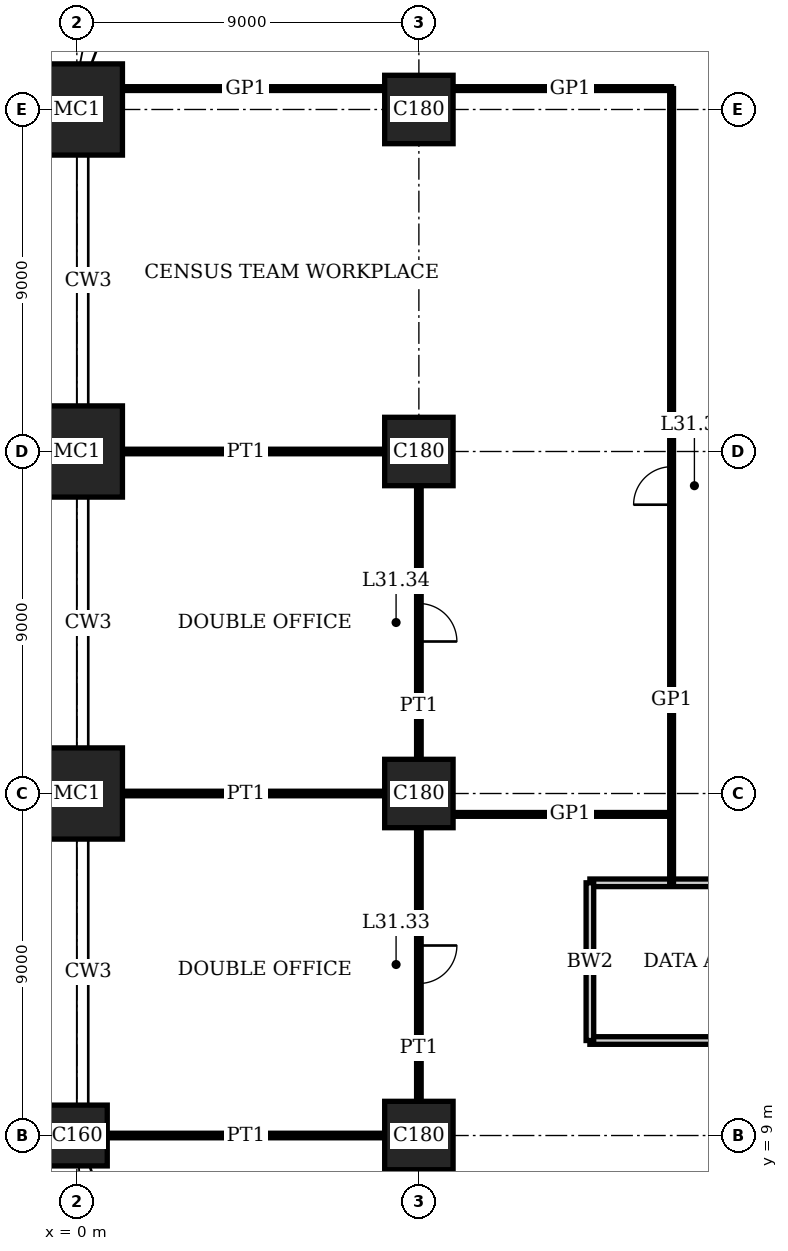
"""IFC4 building model, lengths in metres.
Left out: names, types, materials, properties, quantities, classifications, styles, units other than length and angle.
Written with IfcOpenShell. Run it as: python <this file> out.ifc"""

import sys

from ifc_helpers import new_model, si_unit, direction, frame, frame_2d, origin, origin_2d, place, context, subcontext, project, spatial, rectangle, extrude, element, fill, save


model = new_model("IFC4")
c1 = context("Model", 3, precision=1e-05, world=origin(), true_north=direction((0.0, 1.0)))
c2 = subcontext(c1, "Body", "Model", "MODEL_VIEW")
j1 = project(units=[si_unit("LENGTHUNIT", "METRE"), si_unit("PLANEANGLEUNIT", "RADIAN")], contexts=[c1])
p1 = place(None, origin())
s1 = spatial("IfcSite", under=j1, at=p1, CompositionType="ELEMENT")
p2 = place(p1, origin())
s2 = spatial("IfcBuilding", under=s1, at=p2, CompositionType="ELEMENT")
p3 = place(p2, frame((0.0, 0.0, 129.0)))
s3 = spatial("IfcBuildingStorey", under=s2, at=p3, CompositionType="ELEMENT", Elevation=129.0)
p4 = place(p3, frame((0.0, 9.0, 0.0), z_axis=(0.0, 0.0, 1.0), x_axis=(1.0, 0.0, 0.0)))
e1 = element("IfcColumn", 1, at=p4, inside=s3, PredefinedType="COLUMN", context=c2, shape_type="SweptSolid", body=[
    extrude(rectangle(XDim=1.6, YDim=1.6, at=origin_2d()), origin(), (0.0, 0.0, 1.0), 4.0),
])
for number, where, z_axis, x_axis in (
    (2, (0.0, 18.0, 0.0), (0.0, 0.0, 1.0), (1.0, 0.0, 0.0)),
    (3, (0.0, 27.0, 0.0), (0.0, 0.0, 1.0), (1.0, 0.0, 0.0)),
    (4, (0.0, 36.0, 0.0), (0.0, 0.0, 1.0), (1.0, 0.0, 0.0)),
):
    element("IfcColumn", number, at=place(p3, frame(where, z_axis=z_axis, x_axis=x_axis)), inside=s3, PredefinedType="COLUMN", context=c2, shape_type="SweptSolid", body=[
        extrude(rectangle(XDim=2.4, YDim=2.4, at=origin_2d()), origin(), (0.0, 0.0, 1.0), 4.0),
    ])
for number, where, z_axis, x_axis in (
    (5, (9.0, 9.0, 0.0), (0.0, 0.0, 1.0), (1.0, 0.0, 0.0)),
    (6, (9.0, 18.0, 0.0), (0.0, 0.0, 1.0), (1.0, 0.0, 0.0)),
    (7, (9.0, 27.0, 0.0), (0.0, 0.0, 1.0), (1.0, 0.0, 0.0)),
    (8, (9.0, 36.0, 0.0), (0.0, 0.0, 1.0), (1.0, 0.0, 0.0)),
):
    element("IfcColumn", number, at=place(p3, frame(where, z_axis=z_axis, x_axis=x_axis)), inside=s3, PredefinedType="COLUMN", context=c2, shape_type="SweptSolid", body=[
        extrude(rectangle(XDim=1.8, YDim=1.8, at=origin_2d()), origin(), (0.0, 0.0, 1.0), 4.0),
    ])
p5 = place(p3, frame((0.8, 9.0, 0.0), z_axis=(0.0, 0.0, 1.0), x_axis=(1.0, 0.0, 0.0)))
e9 = element("IfcWall", 9, at=p5, inside=s3, PredefinedType="PARTITIONING", context=c2, shape_type="SweptSolid", body=[
    extrude(rectangle(XDim=7.3, YDim=0.12, at=frame_2d((3.65, 0.0))), origin(), (0.0, 0.0, 1.0), 3.05),
])
p6 = place(p3, frame((13.5, 11.5, 0.0), z_axis=(0.0, 0.0, 1.0), x_axis=(1.0, 0.0, 0.0)))
e10 = element("IfcWall", 10, at=p6, inside=s3, PredefinedType="SOLIDWALL", context=c2, shape_type="SweptSolid", body=[
    extrude(rectangle(XDim=9.0, YDim=0.2, at=frame_2d((4.5, 0.0))), origin(), (0.0, 0.0, 1.0), 3.75),
])
p7 = place(p6, frame((4.0, 0.0, 0.0)))
e11 = element("IfcOpeningElement", 11, at=p7, cuts=e10, PredefinedType="OPENING", context=c2, shape_type="SweptSolid", body=[
    extrude(rectangle(XDim=1.0, YDim=2.4, at=frame_2d((0.5, 1.2))), frame((0.0, 0.11, 0.0), z_axis=(0.0, -1.0, 0.0), x_axis=(1.0, 0.0, 0.0)), (0.0, 0.0, 1.0), 0.22),
])
p8 = place(p3, frame((13.5, 15.65, 0.0), z_axis=(0.0, 0.0, 1.0), x_axis=(1.0, 0.0, 0.0)))
e12 = element("IfcWall", 12, at=p8, inside=s3, PredefinedType="SOLIDWALL", context=c2, shape_type="SweptSolid", body=[
    extrude(rectangle(XDim=9.0, YDim=0.2, at=frame_2d((4.5, 0.0))), origin(), (0.0, 0.0, 1.0), 3.75),
])
p9 = place(p3, frame((9.9, 17.45, 0.0), z_axis=(0.0, 0.0, 1.0), x_axis=(1.0, 0.0, 0.0)))
e13 = element("IfcWall", 13, at=p9, inside=s3, PredefinedType="PARTITIONING", context=c2, shape_type="SweptSolid", body=[
    extrude(rectangle(XDim=5.75, YDim=0.1, at=frame_2d((2.875, 0.0))), origin(), (0.0, 0.0, 1.0), 3.75),
])
for number, where, z_axis, x_axis in (
    (14, (1.2, 18.0, 0.0), (0.0, 0.0, 1.0), (1.0, 0.0, 0.0)),
    (15, (1.2, 27.0, 0.0), (0.0, 0.0, 1.0), (1.0, 0.0, 0.0)),
):
    element("IfcWall", number, at=place(p3, frame(where, z_axis=z_axis, x_axis=x_axis)), inside=s3, PredefinedType="PARTITIONING", context=c2, shape_type="SweptSolid", body=[
        extrude(rectangle(XDim=6.9, YDim=0.12, at=frame_2d((3.45, 0.0))), origin(), (0.0, 0.0, 1.0), 3.05),
    ])
p10 = place(p3, frame((1.2, 36.55, 0.0), z_axis=(0.0, 0.0, 1.0), x_axis=(1.0, 0.0, 0.0)))
e16 = element("IfcWall", 16, at=p10, inside=s3, PredefinedType="PARTITIONING", context=c2, shape_type="SweptSolid", body=[
    extrude(rectangle(XDim=6.9, YDim=0.1, at=frame_2d((3.45, 0.0))), origin(), (0.0, 0.0, 1.0), 3.75),
])
p11 = place(p3, frame((9.9, 36.55, 0.0), z_axis=(0.0, 0.0, 1.0), x_axis=(1.0, 0.0, 0.0)))
e17 = element("IfcWall", 17, at=p11, inside=s3, PredefinedType="PARTITIONING", context=c2, shape_type="SweptSolid", body=[
    extrude(rectangle(XDim=5.75, YDim=0.1, at=frame_2d((2.875, 0.0))), origin(), (0.0, 0.0, 1.0), 3.75),
])
p12 = place(p3, frame((9.0, 9.9, 0.0), z_axis=(0.0, 0.0, 1.0), x_axis=(0.0, 1.0, 0.0)))
e18 = element("IfcWall", 18, at=p12, inside=s3, PredefinedType="PARTITIONING", context=c2, shape_type="SweptSolid", body=[
    extrude(rectangle(XDim=7.2, YDim=0.12, at=frame_2d((3.6, 0.0))), origin(), (0.0, 0.0, 1.0), 3.05),
])
p13 = place(p12, frame((3.1, 0.0, 0.0)))
e19 = element("IfcOpeningElement", 19, at=p13, cuts=e18, PredefinedType="OPENING", context=c2, shape_type="SweptSolid", body=[
    extrude(rectangle(XDim=1.0, YDim=2.4, at=frame_2d((0.5, 1.2))), frame((0.0, 0.07, 0.0), z_axis=(0.0, -1.0, 0.0), x_axis=(1.0, 0.0, 0.0)), (0.0, 0.0, 1.0), 0.14),
])
p14 = place(p3, frame((9.0, 18.9, 0.0), z_axis=(0.0, 0.0, 1.0), x_axis=(0.0, 1.0, 0.0)))
e20 = element("IfcWall", 20, at=p14, inside=s3, PredefinedType="PARTITIONING", context=c2, shape_type="SweptSolid", body=[
    extrude(rectangle(XDim=7.2, YDim=0.12, at=frame_2d((3.6, 0.0))), origin(), (0.0, 0.0, 1.0), 3.05),
])
p15 = place(p14, frame((3.1, 0.0, 0.0)))
e21 = element("IfcOpeningElement", 21, at=p15, cuts=e20, PredefinedType="OPENING", context=c2, shape_type="SweptSolid", body=[
    extrude(rectangle(XDim=1.0, YDim=2.4, at=frame_2d((0.5, 1.2))), frame((0.0, 0.07, 0.0), z_axis=(0.0, -1.0, 0.0), x_axis=(1.0, 0.0, 0.0)), (0.0, 0.0, 1.0), 0.14),
])
p16 = place(p3, frame((13.5, 11.5, 0.0), z_axis=(0.0, 0.0, 1.0), x_axis=(0.0, 1.0, 0.0)))
e22 = element("IfcWall", 22, at=p16, inside=s3, PredefinedType="SOLIDWALL", context=c2, shape_type="SweptSolid", body=[
    extrude(rectangle(XDim=4.15, YDim=0.2, at=frame_2d((2.075, 0.0))), origin(), (0.0, 0.0, 1.0), 3.75),
])
p17 = place(p3, frame((15.65, 15.65, 0.0), z_axis=(0.0, 0.0, 1.0), x_axis=(0.0, 1.0, 0.0)))
e23 = element("IfcWall", 23, at=p17, inside=s3, PredefinedType="PARTITIONING", context=c2, shape_type="SweptSolid", body=[
    extrude(rectangle(XDim=20.9, YDim=0.1, at=frame_2d((10.45, 0.0))), origin(), (0.0, 0.0, 1.0), 3.75),
])
p18 = place(p17, frame((9.95, 0.0, 0.0)))
e24 = element("IfcOpeningElement", 24, at=p18, cuts=e23, PredefinedType="OPENING", context=c2, shape_type="SweptSolid", body=[
    extrude(rectangle(XDim=1.0, YDim=2.4, at=frame_2d((0.5, 1.2))), frame((0.0, 0.06, 0.0), z_axis=(0.0, -1.0, 0.0), x_axis=(1.0, 0.0, 0.0)), (0.0, 0.0, 1.0), 0.12),
])
p19 = place(p13, origin())
e25 = element("IfcDoor", 25, at=p19, inside=s3, OperationType="SINGLE_SWING_RIGHT", PredefinedType="DOOR", context=c2, shape_type="SweptSolid", body=[
    extrude(rectangle(XDim=1.0, YDim=2.4, at=frame_2d((0.5, 1.2))), frame((0.0, 0.025, 0.0), z_axis=(0.0, -1.0, 0.0), x_axis=(1.0, 0.0, 0.0)), (0.0, 0.0, 1.0), 0.05),
])
fill(e19, e25)
p20 = place(p15, origin())
e26 = element("IfcDoor", 26, at=p20, inside=s3, OperationType="SINGLE_SWING_LEFT", PredefinedType="DOOR", context=c2, shape_type="SweptSolid", body=[
    extrude(rectangle(XDim=1.0, YDim=2.4, at=frame_2d((0.5, 1.2))), frame((0.0, 0.025, 0.0), z_axis=(0.0, -1.0, 0.0), x_axis=(1.0, 0.0, 0.0)), (0.0, 0.0, 1.0), 0.05),
])
fill(e21, e26)
p21 = place(p18, origin())
e27 = element("IfcDoor", 27, at=p21, inside=s3, OperationType="SINGLE_SWING_RIGHT", PredefinedType="DOOR", context=c2, shape_type="SweptSolid", body=[
    extrude(rectangle(XDim=1.0, YDim=2.4, at=frame_2d((0.5, 1.2))), frame((0.0, 0.02, 0.0), z_axis=(0.0, -1.0, 0.0), x_axis=(1.0, 0.0, 0.0)), (0.0, 0.0, 1.0), 0.04),
])
fill(e24, e27)
save(model, sys.argv[1])
